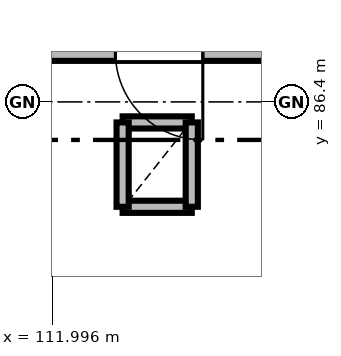
"""IFC4 building model, lengths in metres.
Left out: names, types, materials, properties, quantities, classifications, styles, units other than length and angle.
Written with IfcOpenShell. Run it as: python <this file> out.ifc"""

import sys

from ifc_helpers import new_model, si_unit, direction, frame, frame_2d, origin, place, context, subcontext, project, spatial, rectangle, extrude, element, fill, save


model = new_model("IFC4")
c1 = context("Model", 3, precision=1e-05, world=origin(), true_north=direction((0.0, 1.0)))
c2 = subcontext(c1, "Body", "Model", "MODEL_VIEW")
j1 = project(units=[si_unit("LENGTHUNIT", "METRE"), si_unit("PLANEANGLEUNIT", "RADIAN")], contexts=[c1])
p1 = place(None, origin())
s1 = spatial("IfcSite", under=j1, at=p1, CompositionType="ELEMENT")
p2 = place(p1, origin())
s2 = spatial("IfcBuilding", under=s1, at=p2, CompositionType="ELEMENT")
p3 = place(p2, origin())
s3 = spatial("IfcBuildingStorey", under=s2, at=p3, CompositionType="ELEMENT", Elevation=0.0)
p4 = place(p3, frame((112.92, 85.02, 0.0), z_axis=(0.0, 0.0, 1.0), x_axis=(1.0, 0.0, 0.0)))
e1 = element("IfcWall", 1, at=p4, inside=s3, PredefinedType="PARTITIONING", context=c2, shape_type="SweptSolid", body=[
    extrude(rectangle(XDim=0.91, YDim=0.16, at=frame_2d((0.455, 0.0))), origin(), (0.0, 0.0, 1.0), 4.55),
])
p5 = place(p3, frame((113.83, 86.13, 0.0), z_axis=(0.0, 0.0, 1.0), x_axis=(-1.0, 0.0, 0.0)))
e2 = element("IfcWall", 2, at=p5, inside=s3, PredefinedType="PARTITIONING", context=c2, shape_type="SweptSolid", body=[
    extrude(rectangle(XDim=0.91, YDim=0.16, at=frame_2d((0.455, 0.0))), origin(), (0.0, 0.0, 1.0), 4.005),
])
for number, where, z_axis, x_axis in (
    (3, (112.92, 86.13, 0.0), (0.0, 0.0, 1.0), (0.0, -1.0, 0.0)),
    (4, (113.83, 85.02, 0.0), (0.0, 0.0, 1.0), (0.0, 1.0, 0.0)),
):
    element("IfcWall", number, at=place(p3, frame(where, z_axis=z_axis, x_axis=x_axis)), inside=s3, PredefinedType="PARTITIONING", context=c2, shape_type="SweptSolid", body=[
        extrude(rectangle(XDim=1.11, YDim=0.16, at=frame_2d((0.555, 0.0))), origin(), (0.0, 0.0, 1.0), 4.005),
    ])
p6 = place(p3, frame((134.4, 87.05, 0.0), z_axis=(0.0, 0.0, 1.0), x_axis=(-1.0, 0.0, 0.0)))
e5 = element("IfcWall", 5, at=p6, inside=s3, PredefinedType="SOLIDWALL", context=c2, shape_type="SweptSolid", body=[
    extrude(rectangle(XDim=25.2, YDim=0.22, at=frame_2d((12.6, 0.0))), origin(), (0.0, 0.0, 1.0), 4.105),
])
p7 = place(p6, frame((20.425, 0.0, 0.0)))
e6 = element("IfcOpeningElement", 6, at=p7, cuts=e5, PredefinedType="OPENING", context=c2, shape_type="SweptSolid", body=[
    extrude(rectangle(XDim=1.15, YDim=2.15, at=frame_2d((0.575, 1.075))), frame((0.0, 0.12, 0.0), z_axis=(0.0, -1.0, 0.0), x_axis=(1.0, 0.0, 0.0)), (0.0, 0.0, 1.0), 0.24),
])
p8 = place(p7, origin())
e7 = element("IfcDoor", 7, at=p8, inside=s3, OperationType="SINGLE_SWING_LEFT", PredefinedType="DOOR", context=c2, shape_type="SweptSolid", body=[
    extrude(rectangle(XDim=1.15, YDim=2.15, at=frame_2d((0.575, 1.075))), frame((0.0, 0.025, 0.0), z_axis=(0.0, -1.0, 0.0), x_axis=(1.0, 0.0, 0.0)), (0.0, 0.0, 1.0), 0.05),
])
fill(e6, e7)
save(model, sys.argv[1])
